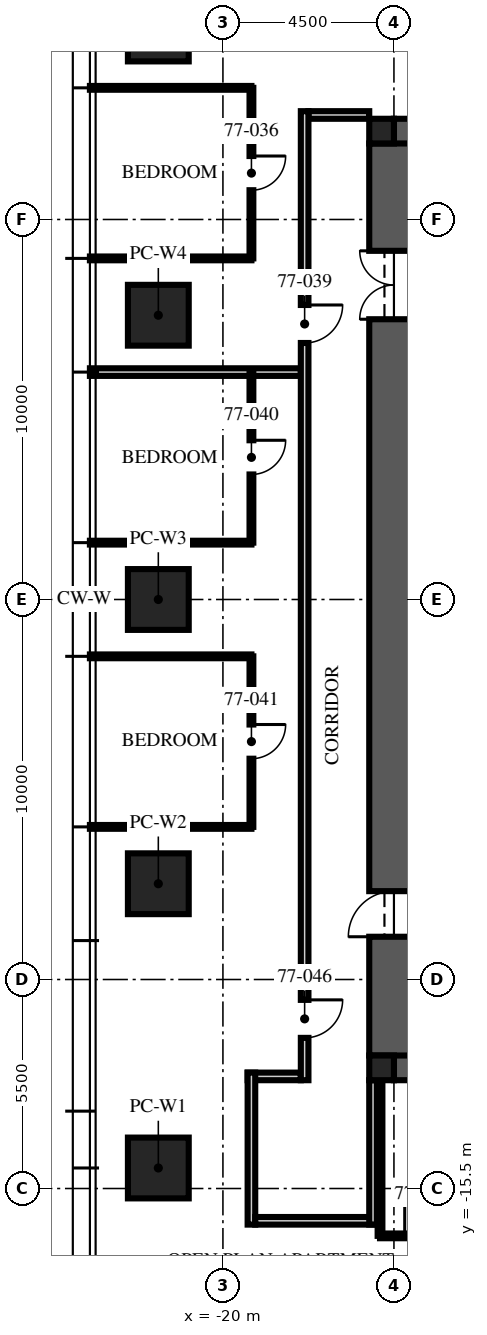
"""IFC4 building model, lengths in metres.
Left out: names, types, materials, properties, quantities, classifications, styles, units other than length and angle.
Written with IfcOpenShell. Run it as: python <this file> out.ifc"""

import sys

from ifc_helpers import new_model, si_unit, direction, frame, frame_2d, origin, origin_2d, place, context, subcontext, project, spatial, rectangle, extrude, element, fill, save


model = new_model("IFC4")
c1 = context("Model", 3, precision=1e-05, world=origin(), true_north=direction((0.0, 1.0)))
c2 = subcontext(c1, "Body", "Model", "MODEL_VIEW")
j1 = project(units=[si_unit("LENGTHUNIT", "METRE"), si_unit("PLANEANGLEUNIT", "RADIAN")], contexts=[c1])
p1 = place(None, origin())
s1 = spatial("IfcSite", under=j1, at=p1, CompositionType="ELEMENT")
p2 = place(p1, origin())
s2 = spatial("IfcBuilding", under=s1, at=p2, CompositionType="ELEMENT")
p3 = place(p2, frame((0.0, 0.0, 308.25)))
s3 = spatial("IfcBuildingStorey", under=s2, at=p3, CompositionType="ELEMENT", Elevation=308.25)
for number, where, z_axis, x_axis in (
    (1, (-15.5, 12.0, -0.25), (0.0, 0.0, 1.0), (1.0, 0.0, 0.0)),
    (2, (-15.5, -12.0, -0.25), (0.0, 0.0, 1.0), (1.0, 0.0, 0.0)),
):
    element("IfcWall", number, at=place(p3, frame(where, z_axis=z_axis, x_axis=x_axis)), inside=s3, PredefinedType="SHEAR", context=c2, shape_type="SweptSolid", body=[
        extrude(rectangle(XDim=31.0, YDim=1.3, at=frame_2d((15.5, 0.0))), origin(), (0.0, 0.0, 1.0), 3.75),
    ])
p4 = place(p3, frame((-15.5, -12.0, -0.25), z_axis=(0.0, 0.0, 1.0), x_axis=(0.0, 1.0, 0.0)))
e3 = element("IfcWall", 3, at=p4, inside=s3, PredefinedType="SHEAR", context=c2, shape_type="SweptSolid", body=[
    extrude(rectangle(XDim=24.0, YDim=1.3, at=frame_2d((12.0, 0.0))), origin(), (0.0, 0.0, 1.0), 3.75),
])
p5 = place(p4, frame((3.125, 0.0, 0.25)))
e4 = element("IfcOpeningElement", 4, at=p5, cuts=e3, PredefinedType="OPENING", context=c2, shape_type="SweptSolid", body=[
    extrude(rectangle(XDim=1.2, YDim=2.1, at=frame_2d((0.6, 1.05))), frame((0.0, 0.66, 0.0), z_axis=(0.0, -1.0, 0.0), x_axis=(1.0, 0.0, 0.0)), (0.0, 0.0, 1.0), 1.32),
])
p6 = place(p4, frame((19.375, 0.0, 0.25)))
e5 = element("IfcOpeningElement", 5, at=p6, cuts=e3, PredefinedType="OPENING", context=c2, shape_type="SweptSolid", body=[
    extrude(rectangle(XDim=1.8, YDim=2.1, at=frame_2d((0.9, 1.05))), frame((0.0, 0.66, 0.0), z_axis=(0.0, -1.0, 0.0), x_axis=(1.0, 0.0, 0.0)), (0.0, 0.0, 1.0), 1.32),
])
for number, where, z_axis, x_axis in (
    (6, (-15.825, 12.325, -0.25), (0.0, 0.0, 1.0), (1.0, 0.0, 0.0)),
    (7, (-15.825, -12.325, -0.25), (0.0, 0.0, 1.0), (1.0, 0.0, 0.0)),
):
    element("IfcColumn", number, at=place(p3, frame(where, z_axis=z_axis, x_axis=x_axis)), inside=s3, PredefinedType="COLUMN", context=c2, shape_type="SweptSolid", body=[
        extrude(rectangle(XDim=0.65, YDim=0.65, at=origin_2d()), origin(), (0.0, 0.0, 1.0), 3.75),
    ])
for number, where, z_axis, x_axis in (
    (8, (-21.7, -14.96, 0.0), (0.0, 0.0, 1.0), (0.0, 1.0, 0.0)),
    (9, (-21.7, -7.48, 0.0), (0.0, 0.0, 1.0), (0.0, 1.0, 0.0)),
    (10, (-21.7, 0.0, 0.0), (0.0, 0.0, 1.0), (0.0, 1.0, 0.0)),
    (11, (-21.7, 7.48, 0.0), (0.0, 0.0, 1.0), (0.0, 1.0, 0.0)),
    (12, (-21.7, 14.96, 0.0), (0.0, 0.0, 1.0), (0.0, 1.0, 0.0)),
):
    element("IfcColumn", number, at=place(p3, frame(where, z_axis=z_axis, x_axis=x_axis)), inside=s3, PredefinedType="COLUMN", context=c2, shape_type="SweptSolid", body=[
        extrude(rectangle(XDim=1.6, YDim=1.6, at=origin_2d()), origin(), (0.0, 0.0, 1.0), 3.75),
    ])
p7 = place(p3, frame((-17.95, -12.55, 0.0), z_axis=(0.0, 0.0, 1.0), x_axis=(-1.0, 0.0, 0.0)))
e13 = element("IfcWall", 13, at=p7, inside=s3, PredefinedType="PARTITIONING", context=c2, shape_type="SweptSolid", body=[
    extrude(rectangle(XDim=1.4, YDim=0.2, at=frame_2d((0.7, 0.0))), origin(), (0.0, 0.0, 1.0), 3.5),
])
p8 = place(p3, frame((-19.25, -12.45, 0.0), z_axis=(0.0, 0.0, 1.0), x_axis=(0.0, -1.0, 0.0)))
e14 = element("IfcWall", 14, at=p8, inside=s3, PredefinedType="PARTITIONING", context=c2, shape_type="SweptSolid", body=[
    extrude(rectangle(XDim=4.0, YDim=0.2, at=frame_2d((2.0, 0.0))), origin(), (0.0, 0.0, 1.0), 2.9),
])
p9 = place(p3, frame((-19.15, -16.35, 0.0), z_axis=(0.0, 0.0, 1.0), x_axis=(1.0, 0.0, 0.0)))
e15 = element("IfcWall", 15, at=p9, inside=s3, PredefinedType="PARTITIONING", context=c2, shape_type="SweptSolid", body=[
    extrude(rectangle(XDim=3.2, YDim=0.2, at=frame_2d((1.6, 0.0))), origin(), (0.0, 0.0, 1.0), 2.6),
])
p10 = place(p3, frame((-16.05, -16.45, 0.0), z_axis=(0.0, 0.0, 1.0), x_axis=(0.0, 1.0, 0.0)))
e16 = element("IfcWall", 16, at=p10, inside=s3, PredefinedType="PARTITIONING", context=c2, shape_type="SweptSolid", body=[
    extrude(rectangle(XDim=3.8, YDim=0.2, at=frame_2d((1.9, 0.0))), origin(), (0.0, 0.0, 1.0), 2.6),
])
p11 = place(p3, frame((-16.15, 12.75, 0.0), z_axis=(0.0, 0.0, 1.0), x_axis=(-1.0, 0.0, 0.0)))
e17 = element("IfcWall", 17, at=p11, inside=s3, PredefinedType="PARTITIONING", context=c2, shape_type="SweptSolid", body=[
    extrude(rectangle(XDim=1.6, YDim=0.2, at=frame_2d((0.8, 0.0))), origin(), (0.0, 0.0, 1.0), 2.6),
])
for number, where, z_axis, x_axis in (
    (18, (-19.25, 13.464, 0.0), (0.0, 0.0, 1.0), (-1.0, 0.0, 0.0)),
    (19, (-19.25, 8.976, 0.0), (0.0, 0.0, 1.0), (-1.0, 0.0, 0.0)),
):
    element("IfcWall", number, at=place(p3, frame(where, z_axis=z_axis, x_axis=x_axis)), inside=s3, PredefinedType="PARTITIONING", context=c2, shape_type="SweptSolid", body=[
        extrude(rectangle(XDim=4.25, YDim=0.1, at=frame_2d((2.125, 0.0))), origin(), (0.0, 0.0, 1.0), 3.01),
    ])
p12 = place(p3, frame((-17.95, 5.984, 0.0), z_axis=(0.0, 0.0, 1.0), x_axis=(-1.0, 0.0, 0.0)))
e20 = element("IfcWall", 20, at=p12, inside=s3, PredefinedType="PARTITIONING", context=c2, shape_type="SweptSolid", body=[
    extrude(rectangle(XDim=5.55, YDim=0.2, at=frame_2d((2.775, 0.0))), origin(), (0.0, 0.0, 1.0), 3.01),
])
for number, where, z_axis, x_axis in (
    (21, (-19.25, 1.496, 0.0), (0.0, 0.0, 1.0), (-1.0, 0.0, 0.0)),
    (22, (-19.25, -1.496, 0.0), (0.0, 0.0, 1.0), (-1.0, 0.0, 0.0)),
    (23, (-19.25, -5.984, 0.0), (0.0, 0.0, 1.0), (-1.0, 0.0, 0.0)),
):
    element("IfcWall", number, at=place(p3, frame(where, z_axis=z_axis, x_axis=x_axis)), inside=s3, PredefinedType="PARTITIONING", context=c2, shape_type="SweptSolid", body=[
        extrude(rectangle(XDim=4.25, YDim=0.1, at=frame_2d((2.125, 0.0))), origin(), (0.0, 0.0, 1.0), 3.01),
    ])
p13 = place(p3, frame((-19.25, 13.464, 0.0), z_axis=(0.0, 0.0, 1.0), x_axis=(0.0, -1.0, 0.0)))
e24 = element("IfcWall", 24, at=p13, inside=s3, PredefinedType="PARTITIONING", context=c2, shape_type="SweptSolid", body=[
    extrude(rectangle(XDim=4.488, YDim=0.1, at=frame_2d((2.244, 0.0))), origin(), (0.0, 0.0, 1.0), 2.91),
])
p14 = place(p13, frame((1.794, 0.0, 0.0)))
e25 = element("IfcOpeningElement", 25, at=p14, cuts=e24, PredefinedType="OPENING", context=c2, shape_type="SweptSolid", body=[
    extrude(rectangle(XDim=0.9, YDim=2.1, at=frame_2d((0.45, 1.05))), frame((0.0, 0.06, 0.0), z_axis=(0.0, -1.0, 0.0), x_axis=(1.0, 0.0, 0.0)), (0.0, 0.0, 1.0), 0.12),
])
p15 = place(p3, frame((-19.25, 5.984, 0.0), z_axis=(0.0, 0.0, 1.0), x_axis=(0.0, -1.0, 0.0)))
e26 = element("IfcWall", 26, at=p15, inside=s3, PredefinedType="PARTITIONING", context=c2, shape_type="SweptSolid", body=[
    extrude(rectangle(XDim=4.488, YDim=0.1, at=frame_2d((2.244, 0.0))), origin(), (0.0, 0.0, 1.0), 2.91),
])
p16 = place(p15, frame((1.794, 0.0, 0.0)))
e27 = element("IfcOpeningElement", 27, at=p16, cuts=e26, PredefinedType="OPENING", context=c2, shape_type="SweptSolid", body=[
    extrude(rectangle(XDim=0.9, YDim=2.1, at=frame_2d((0.45, 1.05))), frame((0.0, 0.06, 0.0), z_axis=(0.0, -1.0, 0.0), x_axis=(1.0, 0.0, 0.0)), (0.0, 0.0, 1.0), 0.12),
])
p17 = place(p3, frame((-19.25, -1.496, 0.0), z_axis=(0.0, 0.0, 1.0), x_axis=(0.0, -1.0, 0.0)))
e28 = element("IfcWall", 28, at=p17, inside=s3, PredefinedType="PARTITIONING", context=c2, shape_type="SweptSolid", body=[
    extrude(rectangle(XDim=4.488, YDim=0.1, at=frame_2d((2.244, 0.0))), origin(), (0.0, 0.0, 1.0), 2.91),
])
p18 = place(p17, frame((1.794, 0.0, 0.0)))
e29 = element("IfcOpeningElement", 29, at=p18, cuts=e28, PredefinedType="OPENING", context=c2, shape_type="SweptSolid", body=[
    extrude(rectangle(XDim=0.9, YDim=2.1, at=frame_2d((0.45, 1.05))), frame((0.0, 0.06, 0.0), z_axis=(0.0, -1.0, 0.0), x_axis=(1.0, 0.0, 0.0)), (0.0, 0.0, 1.0), 0.12),
])
p19 = place(p3, frame((-15.866, -16.746, 0.0), z_axis=(0.0, 0.0, 1.0), x_axis=(1.0, 0.0, 0.0)))
e30 = element("IfcWall", 30, at=p19, inside=s3, PredefinedType="PARTITIONING", context=c2, shape_type="SweptSolid", body=[
    extrude(rectangle(XDim=4.4, YDim=0.125, at=frame_2d((2.2, 0.0))), origin(), (0.0, 0.0, 1.0), 2.9),
])
p20 = place(p19, frame((0.65, 0.0, 0.0)))
e31 = element("IfcOpeningElement", 31, at=p20, cuts=e30, PredefinedType="OPENING", context=c2, shape_type="SweptSolid", body=[
    extrude(rectangle(XDim=0.9, YDim=2.1, at=frame_2d((0.45, 1.05))), frame((0.0, 0.073, 0.0), z_axis=(0.0, -1.0, 0.0), x_axis=(1.0, 0.0, 0.0)), (0.0, 0.0, 1.0), 0.145),
])
p21 = place(p19, frame((2.85, 0.0, 0.0)))
e32 = element("IfcOpeningElement", 32, at=p21, cuts=e30, PredefinedType="OPENING", context=c2, shape_type="SweptSolid", body=[
    extrude(rectangle(XDim=0.9, YDim=2.1, at=frame_2d((0.45, 1.05))), frame((0.0, 0.073, 0.0), z_axis=(0.0, -1.0, 0.0), x_axis=(1.0, 0.0, 0.0)), (0.0, 0.0, 1.0), 0.145),
])
p22 = place(p3, frame((-15.866, -12.65, 0.0), z_axis=(0.0, 0.0, 1.0), x_axis=(0.0, -1.0, 0.0)))
e33 = element("IfcWall", 33, at=p22, inside=s3, PredefinedType="PARTITIONING", context=c2, shape_type="SweptSolid", body=[
    extrude(rectangle(XDim=4.096, YDim=0.125, at=frame_2d((2.048, 0.0))), origin(), (0.0, 0.0, 1.0), 2.6),
])
p23 = place(p3, frame((-17.85, 12.85, 0.0), z_axis=(0.0, 0.0, 1.0), x_axis=(0.0, -1.0, 0.0)))
e34 = element("IfcWall", 34, at=p23, inside=s3, PredefinedType="PARTITIONING", context=c2, shape_type="SweptSolid", body=[
    extrude(rectangle(XDim=25.5, YDim=0.2, at=frame_2d((12.75, 0.0))), origin(), (0.0, 0.0, 1.0), 2.9),
])
p24 = place(p23, frame((5.1, 0.0, 0.0)))
e35 = element("IfcOpeningElement", 35, at=p24, cuts=e34, PredefinedType="OPENING", context=c2, shape_type="SweptSolid", body=[
    extrude(rectangle(XDim=1.0, YDim=2.2, at=frame_2d((0.5, 1.1))), frame((0.0, 0.11, 0.0), z_axis=(0.0, -1.0, 0.0), x_axis=(1.0, 0.0, 0.0)), (0.0, 0.0, 1.0), 0.22),
])
p25 = place(p23, frame((23.386, 0.0, 0.0)))
e36 = element("IfcOpeningElement", 36, at=p25, cuts=e34, PredefinedType="OPENING", context=c2, shape_type="SweptSolid", body=[
    extrude(rectangle(XDim=1.0, YDim=2.2, at=frame_2d((0.5, 1.1))), frame((0.0, 0.11, 0.0), z_axis=(0.0, -1.0, 0.0), x_axis=(1.0, 0.0, 0.0)), (0.0, 0.0, 1.0), 0.22),
])
p26 = place(p5, origin())
e37 = element("IfcDoor", 37, at=p26, inside=s3, OperationType="SINGLE_SWING_LEFT", PredefinedType="DOOR", context=c2, shape_type="SweptSolid", body=[
    extrude(rectangle(XDim=1.2, YDim=2.1, at=frame_2d((0.6, 1.05))), frame((0.0, 0.025, 0.0), z_axis=(0.0, -1.0, 0.0), x_axis=(1.0, 0.0, 0.0)), (0.0, 0.0, 1.0), 0.05),
])
fill(e4, e37)
p27 = place(p6, origin())
e38 = element("IfcDoor", 38, at=p27, inside=s3, OperationType="DOUBLE_DOOR_SINGLE_SWING", PredefinedType="DOOR", context=c2, shape_type="SweptSolid", body=[
    extrude(rectangle(XDim=1.8, YDim=2.1, at=frame_2d((0.9, 1.05))), frame((0.0, 0.025, 0.0), z_axis=(0.0, -1.0, 0.0), x_axis=(1.0, 0.0, 0.0)), (0.0, 0.0, 1.0), 0.05),
])
fill(e5, e38)
p28 = place(p14, origin())
e39 = element("IfcDoor", 39, at=p28, inside=s3, OperationType="SINGLE_SWING_LEFT", PredefinedType="DOOR", context=c2, shape_type="SweptSolid", body=[
    extrude(rectangle(XDim=0.9, YDim=2.1, at=frame_2d((0.45, 1.05))), frame((0.0, 0.025, 0.0), z_axis=(0.0, -1.0, 0.0), x_axis=(1.0, 0.0, 0.0)), (0.0, 0.0, 1.0), 0.05),
])
fill(e25, e39)
p29 = place(p24, origin())
e40 = element("IfcDoor", 40, at=p29, inside=s3, OperationType="SINGLE_SWING_LEFT", PredefinedType="DOOR", context=c2, shape_type="SweptSolid", body=[
    extrude(rectangle(XDim=1.0, YDim=2.2, at=frame_2d((0.5, 1.1))), frame((0.0, 0.025, 0.0), z_axis=(0.0, -1.0, 0.0), x_axis=(1.0, 0.0, 0.0)), (0.0, 0.0, 1.0), 0.05),
])
fill(e35, e40)
p30 = place(p16, origin())
e41 = element("IfcDoor", 41, at=p30, inside=s3, OperationType="SINGLE_SWING_LEFT", PredefinedType="DOOR", context=c2, shape_type="SweptSolid", body=[
    extrude(rectangle(XDim=0.9, YDim=2.1, at=frame_2d((0.45, 1.05))), frame((0.0, 0.025, 0.0), z_axis=(0.0, -1.0, 0.0), x_axis=(1.0, 0.0, 0.0)), (0.0, 0.0, 1.0), 0.05),
])
fill(e27, e41)
p31 = place(p18, origin())
e42 = element("IfcDoor", 42, at=p31, inside=s3, OperationType="SINGLE_SWING_LEFT", PredefinedType="DOOR", context=c2, shape_type="SweptSolid", body=[
    extrude(rectangle(XDim=0.9, YDim=2.1, at=frame_2d((0.45, 1.05))), frame((0.0, 0.025, 0.0), z_axis=(0.0, -1.0, 0.0), x_axis=(1.0, 0.0, 0.0)), (0.0, 0.0, 1.0), 0.05),
])
fill(e29, e42)
p32 = place(p20, origin())
e43 = element("IfcDoor", 43, at=p32, inside=s3, OperationType="SINGLE_SWING_LEFT", PredefinedType="DOOR", context=c2, shape_type="SweptSolid", body=[
    extrude(rectangle(XDim=0.9, YDim=2.1, at=frame_2d((0.45, 1.05))), frame((0.0, 0.025, 0.0), z_axis=(0.0, -1.0, 0.0), x_axis=(1.0, 0.0, 0.0)), (0.0, 0.0, 1.0), 0.05),
])
fill(e31, e43)
p33 = place(p25, origin())
e44 = element("IfcDoor", 44, at=p33, inside=s3, OperationType="SINGLE_SWING_LEFT", PredefinedType="DOOR", context=c2, shape_type="SweptSolid", body=[
    extrude(rectangle(XDim=1.0, YDim=2.2, at=frame_2d((0.5, 1.1))), frame((0.0, 0.025, 0.0), z_axis=(0.0, -1.0, 0.0), x_axis=(1.0, 0.0, 0.0)), (0.0, 0.0, 1.0), 0.05),
])
fill(e36, e44)
save(model, sys.argv[1])
